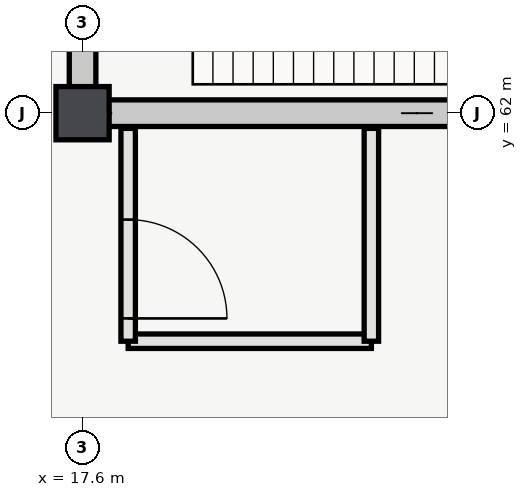
"""IFC4 building model, lengths in metres.
Left out: names, types, materials, properties, quantities, classifications, styles, units other than length and angle.
Written with IfcOpenShell. Run it as: python <this file> out.ifc"""

import sys

from ifc_helpers import new_model, si_unit, direction, frame, frame_2d, origin, origin_2d, place, context, subcontext, project, spatial, rectangle, extrude, element, fill, save


model = new_model("IFC4")
c1 = context("Model", 3, precision=1e-05, world=origin(), true_north=direction((0.0, 1.0)))
c2 = subcontext(c1, "Body", "Model", "MODEL_VIEW")
j1 = project(units=[si_unit("LENGTHUNIT", "METRE"), si_unit("PLANEANGLEUNIT", "RADIAN")], contexts=[c1])
p1 = place(None, origin())
s1 = spatial("IfcSite", under=j1, at=p1, CompositionType="ELEMENT")
p2 = place(p1, origin())
s2 = spatial("IfcBuilding", under=s1, at=p2, CompositionType="ELEMENT")
p3 = place(p2, frame((0.0, 0.0, -4.8)))
s3 = spatial("IfcBuildingStorey", under=s2, at=p3, CompositionType="ELEMENT", Elevation=-4.8)
p4 = place(p3, frame((17.6, 62.0, 0.0), z_axis=(0.0, 0.0, 1.0), x_axis=(1.0, 0.0, 0.0)))
e1 = element("IfcColumn", 1, at=p4, inside=s3, PredefinedType="COLUMN", context=c2, shape_type="SweptSolid", body=[
    extrude(rectangle(XDim=0.7, YDim=0.7, at=origin_2d()), origin(), (0.0, 0.0, 1.0), 4.8),
])
p5 = place(p3, frame((17.425, 62.0, 0.0), z_axis=(0.0, 0.0, 1.0), x_axis=(1.0, 0.0, 0.0)))
e2 = element("IfcWall", 2, at=p5, inside=s3, PredefinedType="SHEAR", context=c2, shape_type="SweptSolid", body=[
    extrude(rectangle(XDim=9.15, YDim=0.35, at=frame_2d((4.575, 0.0))), origin(), (0.0, 0.0, 1.0), 4.52),
])
p6 = place(p3, frame((17.6, 62.175, 0.0), z_axis=(0.0, 0.0, 1.0), x_axis=(0.0, 1.0, 0.0)))
e3 = element("IfcWall", 3, at=p6, inside=s3, PredefinedType="SHEAR", context=c2, shape_type="SweptSolid", body=[
    extrude(rectangle(XDim=7.65, YDim=0.35, at=frame_2d((3.825, 0.0))), origin(), (0.0, 0.0, 1.0), 4.52),
])
p7 = place(p6, frame((1.65, 0.0, 0.0)))
e4 = element("IfcOpeningElement", 4, at=p7, cuts=e3, PredefinedType="OPENING", context=c2, shape_type="SweptSolid", body=[
    extrude(rectangle(XDim=1.35, YDim=2.2, at=frame_2d((0.675, 1.1))), frame((0.0, 0.185, 0.0), z_axis=(0.0, -1.0, 0.0), x_axis=(1.0, 0.0, 0.0)), (0.0, 0.0, 1.0), 0.37),
])
p8 = place(p6, frame((5.675, 0.0, 0.0)))
e5 = element("IfcOpeningElement", 5, at=p8, cuts=e3, PredefinedType="OPENING", context=c2, shape_type="SweptSolid", body=[
    extrude(rectangle(XDim=1.0, YDim=2.15, at=frame_2d((0.5, 1.075))), frame((0.0, 0.185, 0.0), z_axis=(0.0, -1.0, 0.0), x_axis=(1.0, 0.0, 0.0)), (0.0, 0.0, 1.0), 0.37),
])
p9 = place(p3, frame((18.2, 59.0, 0.0), z_axis=(0.0, 0.0, 1.0), x_axis=(1.0, 0.0, 0.0)))
e6 = element("IfcWall", 6, at=p9, inside=s3, PredefinedType="PARTITIONING", context=c2, shape_type="SweptSolid", body=[
    extrude(rectangle(XDim=3.2, YDim=0.19, at=frame_2d((1.6, 0.0))), origin(), (0.0, 0.0, 1.0), 4.52),
])
p10 = place(p3, frame((18.2, 61.8, 0.0), z_axis=(0.0, 0.0, 1.0), x_axis=(0.0, -1.0, 0.0)))
e7 = element("IfcWall", 7, at=p10, inside=s3, PredefinedType="PARTITIONING", context=c2, shape_type="SweptSolid", body=[
    extrude(rectangle(XDim=2.8, YDim=0.19, at=frame_2d((1.4, 0.0))), origin(), (0.0, 0.0, 1.0), 4.52),
])
p11 = place(p10, frame((1.2, 0.0, 0.0)))
e8 = element("IfcOpeningElement", 8, at=p11, cuts=e7, PredefinedType="OPENING", context=c2, shape_type="SweptSolid", body=[
    extrude(rectangle(XDim=1.3, YDim=2.2, at=frame_2d((0.65, 1.1))), frame((0.0, 0.105, 0.0), z_axis=(0.0, -1.0, 0.0), x_axis=(1.0, 0.0, 0.0)), (0.0, 0.0, 1.0), 0.21),
])
p12 = place(p3, frame((21.4, 59.0, 0.0), z_axis=(0.0, 0.0, 1.0), x_axis=(0.0, 1.0, 0.0)))
e9 = element("IfcWall", 9, at=p12, inside=s3, PredefinedType="PARTITIONING", context=c2, shape_type="SweptSolid", body=[
    extrude(rectangle(XDim=2.8, YDim=0.19, at=frame_2d((1.4, 0.0))), origin(), (0.0, 0.0, 1.0), 4.52),
])
p13 = place(p11, origin())
e10 = element("IfcDoor", 10, at=p13, inside=s3, OperationType="SINGLE_SWING_RIGHT", PredefinedType="DOOR", context=c2, shape_type="SweptSolid", body=[
    extrude(rectangle(XDim=1.3, YDim=2.2, at=frame_2d((0.65, 1.1))), frame((0.0, 0.025, 0.0), z_axis=(0.0, -1.0, 0.0), x_axis=(1.0, 0.0, 0.0)), (0.0, 0.0, 1.0), 0.05),
])
fill(e8, e10)
save(model, sys.argv[1])
